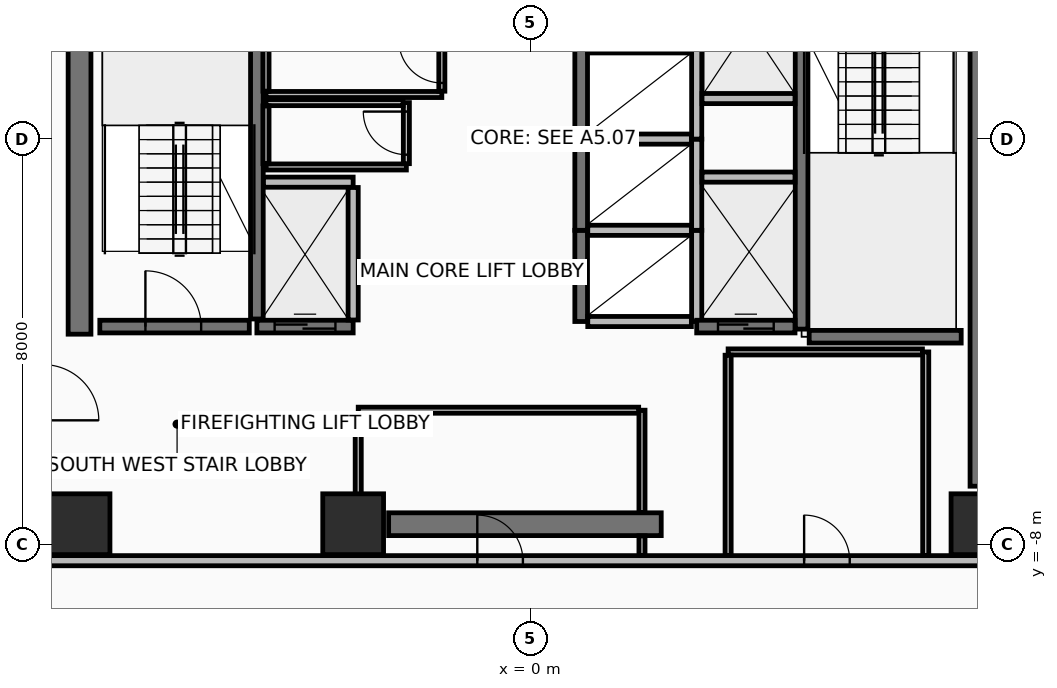
"""IFC4 building model, lengths in metres.
Left out: names, types, materials, properties, quantities, classifications, styles, units other than length and angle.
Written with IfcOpenShell. Run it as: python <this file> out.ifc"""

import sys

from ifc_helpers import new_model, si_unit, direction, frame, frame_2d, origin, origin_2d, place, context, subcontext, project, spatial, rectangle, extrude, element, fill, save


model = new_model("IFC4")
c1 = context("Model", 3, precision=1e-05, world=origin(), true_north=direction((0.0, 1.0)))
c2 = subcontext(c1, "Body", "Model", "MODEL_VIEW")
j1 = project(units=[si_unit("LENGTHUNIT", "METRE"), si_unit("PLANEANGLEUNIT", "RADIAN")], contexts=[c1])
p1 = place(None, origin())
s1 = spatial("IfcSite", under=j1, at=p1, CompositionType="ELEMENT")
p2 = place(p1, origin())
s2 = spatial("IfcBuilding", under=s1, at=p2, CompositionType="ELEMENT")
p3 = place(p2, frame((0.0, 0.0, 93.3)))
s3 = spatial("IfcBuildingStorey", under=s2, at=p3, CompositionType="ELEMENT", Elevation=93.3)
for number, where, z_axis, x_axis in (
    (1, (-8.9, -7.6, 0.0), (0.0, 0.0, 1.0), (1.0, 0.0, 0.0)),
    (2, (-3.5, -7.6, 0.0), (0.0, 0.0, 1.0), (1.0, 0.0, 0.0)),
    (3, (8.9, -7.6, 0.0), (0.0, 0.0, 1.0), (1.0, 0.0, 0.0)),
):
    element("IfcColumn", number, at=place(p3, frame(where, z_axis=z_axis, x_axis=x_axis)), inside=s3, PredefinedType="COLUMN", context=c2, shape_type="SweptSolid", body=[
        extrude(rectangle(XDim=1.2, YDim=1.2, at=origin_2d()), origin(), (0.0, 0.0, 1.0), 3.6),
    ])
p4 = place(p3, frame((-2.8, -7.6, 0.0), z_axis=(0.0, 0.0, 1.0), x_axis=(1.0, 0.0, 0.0)))
e4 = element("IfcWall", 4, at=p4, inside=s3, PredefinedType="SHEAR", context=c2, shape_type="SweptSolid", body=[
    extrude(rectangle(XDim=5.38, YDim=0.45, at=frame_2d((2.69, 0.0))), origin(), (0.0, 0.0, 1.0), 3.41),
])
for number, where, z_axis, x_axis in (
    (5, (-8.9, -3.85, 0.0), (0.0, 0.0, 1.0), (0.0, 1.0, 0.0)),
    (6, (8.9, -6.85, 0.0), (0.0, 0.0, 1.0), (0.0, 1.0, 0.0)),
):
    element("IfcWall", number, at=place(p3, frame(where, z_axis=z_axis, x_axis=x_axis)), inside=s3, PredefinedType="SHEAR", context=c2, shape_type="SweptSolid", body=[
        extrude(rectangle(XDim=10.7, YDim=0.45, at=frame_2d((5.35, 0.0))), origin(), (0.0, 0.0, 1.0), 3.41),
    ])
p5 = place(p3, frame((-9.62, -8.32, 0.0), z_axis=(0.0, 0.0, 1.0), x_axis=(1.0, 0.0, 0.0)))
e7 = element("IfcWall", 7, at=p5, inside=s3, PredefinedType="PARTITIONING", context=c2, shape_type="SweptSolid", body=[
    extrude(rectangle(XDim=19.24, YDim=0.2, at=frame_2d((9.62, 0.0))), origin(), (0.0, 0.0, 1.0), 2.805),
])
p6 = place(p5, frame((8.57, 0.0, 0.0)))
e8 = element("IfcOpeningElement", 8, at=p6, cuts=e7, PredefinedType="OPENING", context=c2, shape_type="SweptSolid", body=[
    extrude(rectangle(XDim=0.9, YDim=2.1, at=frame_2d((0.45, 1.05))), frame((0.0, 0.11, 0.0), z_axis=(0.0, -1.0, 0.0), x_axis=(1.0, 0.0, 0.0)), (0.0, 0.0, 1.0), 0.22),
])
p7 = place(p5, frame((15.02, 0.0, 0.0)))
e9 = element("IfcOpeningElement", 9, at=p7, cuts=e7, PredefinedType="OPENING", context=c2, shape_type="SweptSolid", body=[
    extrude(rectangle(XDim=0.9, YDim=2.1, at=frame_2d((0.45, 1.05))), frame((0.0, 0.11, 0.0), z_axis=(0.0, -1.0, 0.0), x_axis=(1.0, 0.0, 0.0)), (0.0, 0.0, 1.0), 0.22),
])
p8 = place(p3, frame((-5.4, -3.55, 0.0), z_axis=(0.0, 0.0, 1.0), x_axis=(0.0, 1.0, 0.0)))
e10 = element("IfcWall", 10, at=p8, inside=s3, PredefinedType="SHEAR", context=c2, shape_type="SweptSolid", body=[
    extrude(rectangle(XDim=7.3, YDim=0.25, at=frame_2d((3.65, 0.0))), origin(), (0.0, 0.0, 1.0), 3.41),
])
p9 = place(p3, frame((-8.5, -3.7, 0.0), z_axis=(0.0, 0.0, 1.0), x_axis=(1.0, 0.0, 0.0)))
e11 = element("IfcWall", 11, at=p9, inside=s3, PredefinedType="SHEAR", context=c2, shape_type="SweptSolid", body=[
    extrude(rectangle(XDim=2.95, YDim=0.25, at=frame_2d((1.475, 0.0))), origin(), (0.0, 0.0, 1.0), 3.41),
])
p10 = place(p9, frame((0.9, 0.0, 0.0)))
e12 = element("IfcOpeningElement", 12, at=p10, cuts=e11, PredefinedType="OPENING", context=c2, shape_type="SweptSolid", body=[
    extrude(rectangle(XDim=1.1, YDim=2.15, at=frame_2d((0.55, 1.075))), frame((0.0, 0.135, 0.0), z_axis=(0.0, -1.0, 0.0), x_axis=(1.0, 0.0, 0.0)), (0.0, 0.0, 1.0), 0.27),
])
p11 = place(p3, frame((5.35, -3.75, 0.0), z_axis=(0.0, 0.0, 1.0), x_axis=(0.0, 1.0, 0.0)))
e13 = element("IfcWall", 13, at=p11, inside=s3, PredefinedType="SHEAR", context=c2, shape_type="SweptSolid", body=[
    extrude(rectangle(XDim=7.3, YDim=0.25, at=frame_2d((3.65, 0.0))), origin(), (0.0, 0.0, 1.0), 3.41),
])
p12 = place(p3, frame((5.5, -3.9, 0.0), z_axis=(0.0, 0.0, 1.0), x_axis=(1.0, 0.0, 0.0)))
e14 = element("IfcWall", 14, at=p12, inside=s3, PredefinedType="SHEAR", context=c2, shape_type="SweptSolid", body=[
    extrude(rectangle(XDim=3.0, YDim=0.25, at=frame_2d((1.5, 0.0))), origin(), (0.0, 0.0, 1.0), 3.41),
])
p13 = place(p3, frame((1.0, -3.6, 0.0), z_axis=(0.0, 0.0, 1.0), x_axis=(0.0, 1.0, 0.0)))
e15 = element("IfcWall", 15, at=p13, inside=s3, PredefinedType="SHEAR", context=c2, shape_type="SweptSolid", body=[
    extrude(rectangle(XDim=1.8, YDim=0.25, at=frame_2d((0.9, 0.0))), origin(), (0.0, 0.0, 1.0), 3.41),
])
p14 = place(p3, frame((3.28, -3.6, 0.0), z_axis=(0.0, 0.0, 1.0), x_axis=(0.0, 1.0, 0.0)))
e16 = element("IfcWall", 16, at=p14, inside=s3, PredefinedType="PARTITIONING", context=c2, shape_type="SweptSolid", body=[
    extrude(rectangle(XDim=1.8, YDim=0.2, at=frame_2d((0.9, 0.0))), origin(), (0.0, 0.0, 1.0), 3.41),
])
for number, where, z_axis, x_axis in (
    (17, (1.13, -3.6, 0.0), (0.0, 0.0, 1.0), (1.0, 0.0, 0.0)),
    (18, (1.13, -1.8, 0.0), (0.0, 0.0, 1.0), (1.0, 0.0, 0.0)),
):
    element("IfcWall", number, at=place(p3, frame(where, z_axis=z_axis, x_axis=x_axis)), inside=s3, PredefinedType="PARTITIONING", context=c2, shape_type="SweptSolid", body=[
        extrude(rectangle(XDim=2.045, YDim=0.2, at=frame_2d((1.022, 0.0))), origin(), (0.0, 0.0, 1.0), 3.41),
    ])
p15 = place(p3, frame((1.0, -1.8, 0.0), z_axis=(0.0, 0.0, 1.0), x_axis=(0.0, 1.0, 0.0)))
e19 = element("IfcWall", 19, at=p15, inside=s3, PredefinedType="SHEAR", context=c2, shape_type="SweptSolid", body=[
    extrude(rectangle(XDim=1.8, YDim=0.25, at=frame_2d((0.9, 0.0))), origin(), (0.0, 0.0, 1.0), 3.41),
])
p16 = place(p3, frame((3.28, -1.8, 0.0), z_axis=(0.0, 0.0, 1.0), x_axis=(0.0, 1.0, 0.0)))
e20 = element("IfcWall", 20, at=p16, inside=s3, PredefinedType="PARTITIONING", context=c2, shape_type="SweptSolid", body=[
    extrude(rectangle(XDim=1.8, YDim=0.2, at=frame_2d((0.9, 0.0))), origin(), (0.0, 0.0, 1.0), 3.41),
])
p17 = place(p3, frame((1.13, 0.0, 0.0), z_axis=(0.0, 0.0, 1.0), x_axis=(1.0, 0.0, 0.0)))
e21 = element("IfcWall", 21, at=p17, inside=s3, PredefinedType="PARTITIONING", context=c2, shape_type="SweptSolid", body=[
    extrude(rectangle(XDim=2.045, YDim=0.2, at=frame_2d((1.022, 0.0))), origin(), (0.0, 0.0, 1.0), 3.41),
])
p18 = place(p3, frame((1.0, 0.0, 0.0), z_axis=(0.0, 0.0, 1.0), x_axis=(0.0, 1.0, 0.0)))
e22 = element("IfcWall", 22, at=p18, inside=s3, PredefinedType="SHEAR", context=c2, shape_type="SweptSolid", body=[
    extrude(rectangle(XDim=1.8, YDim=0.25, at=frame_2d((0.9, 0.0))), origin(), (0.0, 0.0, 1.0), 3.41),
])
p19 = place(p3, frame((3.28, 0.0, 0.0), z_axis=(0.0, 0.0, 1.0), x_axis=(0.0, 1.0, 0.0)))
e23 = element("IfcWall", 23, at=p19, inside=s3, PredefinedType="PARTITIONING", context=c2, shape_type="SweptSolid", body=[
    extrude(rectangle(XDim=1.8, YDim=0.2, at=frame_2d((0.9, 0.0))), origin(), (0.0, 0.0, 1.0), 3.41),
])
p20 = place(p3, frame((1.13, 1.8, 0.0), z_axis=(0.0, 0.0, 1.0), x_axis=(1.0, 0.0, 0.0)))
e24 = element("IfcWall", 24, at=p20, inside=s3, PredefinedType="PARTITIONING", context=c2, shape_type="SweptSolid", body=[
    extrude(rectangle(XDim=2.045, YDim=0.2, at=frame_2d((1.022, 0.0))), origin(), (0.0, 0.0, 1.0), 3.41),
])
p21 = place(p3, frame((-5.4, -3.7, 0.0), z_axis=(0.0, 0.0, 1.0), x_axis=(1.0, 0.0, 0.0)))
e25 = element("IfcWall", 25, at=p21, inside=s3, PredefinedType="SHEAR", context=c2, shape_type="SweptSolid", body=[
    extrude(rectangle(XDim=1.9, YDim=0.25, at=frame_2d((0.95, 0.0))), origin(), (0.0, 0.0, 1.0), 3.41),
])
p22 = place(p21, frame((0.35, 0.0, 0.0)))
e26 = element("IfcOpeningElement", 26, at=p22, cuts=e25, PredefinedType="OPENING", context=c2, shape_type="SweptSolid", body=[
    extrude(rectangle(XDim=1.2, YDim=2.2, at=frame_2d((0.6, 1.1))), frame((0.0, 0.135, 0.0), z_axis=(0.0, -1.0, 0.0), x_axis=(1.0, 0.0, 0.0)), (0.0, 0.0, 1.0), 0.27),
])
p23 = place(p3, frame((-5.27, -0.85, 0.0), z_axis=(0.0, 0.0, 1.0), x_axis=(1.0, 0.0, 0.0)))
e27 = element("IfcWall", 27, at=p23, inside=s3, PredefinedType="PARTITIONING", context=c2, shape_type="SweptSolid", body=[
    extrude(rectangle(XDim=1.77, YDim=0.2, at=frame_2d((0.885, 0.0))), origin(), (0.0, 0.0, 1.0), 3.41),
])
p24 = place(p3, frame((-3.5, -3.57, 0.0), z_axis=(0.0, 0.0, 1.0), x_axis=(0.0, 1.0, 0.0)))
e28 = element("IfcWall", 28, at=p24, inside=s3, PredefinedType="PARTITIONING", context=c2, shape_type="SweptSolid", body=[
    extrude(rectangle(XDim=2.615, YDim=0.2, at=frame_2d((1.308, 0.0))), origin(), (0.0, 0.0, 1.0), 3.41),
])
p25 = place(p3, frame((3.385, 0.8, 0.0), z_axis=(0.0, 0.0, 1.0), x_axis=(1.0, 0.0, 0.0)))
e29 = element("IfcWall", 29, at=p25, inside=s3, PredefinedType="PARTITIONING", context=c2, shape_type="SweptSolid", body=[
    extrude(rectangle(XDim=1.835, YDim=0.2, at=frame_2d((0.917, 0.0))), origin(), (0.0, 0.0, 1.0), 3.41),
])
p26 = place(p3, frame((3.28, -3.7, 0.0), z_axis=(0.0, 0.0, 1.0), x_axis=(1.0, 0.0, 0.0)))
e30 = element("IfcWall", 30, at=p26, inside=s3, PredefinedType="SHEAR", context=c2, shape_type="SweptSolid", body=[
    extrude(rectangle(XDim=1.94, YDim=0.25, at=frame_2d((0.97, 0.0))), origin(), (0.0, 0.0, 1.0), 3.41),
])
p27 = place(p26, frame((0.42, 0.0, 0.0)))
e31 = element("IfcOpeningElement", 31, at=p27, cuts=e30, PredefinedType="OPENING", context=c2, shape_type="SweptSolid", body=[
    extrude(rectangle(XDim=1.1, YDim=2.2, at=frame_2d((0.55, 1.1))), frame((0.0, 0.135, 0.0), z_axis=(0.0, -1.0, 0.0), x_axis=(1.0, 0.0, 0.0)), (0.0, 0.0, 1.0), 0.27),
])
p28 = place(p3, frame((3.385, -0.75, 0.0), z_axis=(0.0, 0.0, 1.0), x_axis=(1.0, 0.0, 0.0)))
e32 = element("IfcWall", 32, at=p28, inside=s3, PredefinedType="PARTITIONING", context=c2, shape_type="SweptSolid", body=[
    extrude(rectangle(XDim=1.835, YDim=0.2, at=frame_2d((0.917, 0.0))), origin(), (0.0, 0.0, 1.0), 3.41),
])
p29 = place(p3, frame((-5.22, 0.88, 0.0), z_axis=(0.0, 0.0, 1.0), x_axis=(1.0, 0.0, 0.0)))
e33 = element("IfcWall", 33, at=p29, inside=s3, PredefinedType="PARTITIONING", context=c2, shape_type="SweptSolid", body=[
    extrude(rectangle(XDim=3.47, YDim=0.12, at=frame_2d((1.735, 0.0))), origin(), (0.0, 0.0, 1.0), 3.41),
])
p30 = place(p3, frame((-1.75, 0.945, 0.0), z_axis=(0.0, 0.0, 1.0), x_axis=(0.0, 1.0, 0.0)))
e34 = element("IfcWall", 34, at=p30, inside=s3, PredefinedType="PARTITIONING", context=c2, shape_type="SweptSolid", body=[
    extrude(rectangle(XDim=1.175, YDim=0.12, at=frame_2d((0.587, 0.0))), origin(), (0.0, 0.0, 1.0), 3.41),
])
p31 = place(p30, frame((0.163, 0.0, 0.0)))
e35 = element("IfcOpeningElement", 35, at=p31, cuts=e34, PredefinedType="OPENING", context=c2, shape_type="SweptSolid", body=[
    extrude(rectangle(XDim=0.85, YDim=2.1, at=frame_2d((0.425, 1.05))), frame((0.0, 0.07, 0.0), z_axis=(0.0, -1.0, 0.0), x_axis=(1.0, 0.0, 0.0)), (0.0, 0.0, 1.0), 0.14),
])
p32 = place(p3, frame((-5.22, 2.055, 0.0), z_axis=(0.0, 0.0, 1.0), x_axis=(0.0, -1.0, 0.0)))
e36 = element("IfcWall", 36, at=p32, inside=s3, PredefinedType="PARTITIONING", context=c2, shape_type="SweptSolid", body=[
    extrude(rectangle(XDim=1.11, YDim=0.12, at=frame_2d((0.555, 0.0))), origin(), (0.0, 0.0, 1.0), 3.41),
])
p33 = place(p3, frame((-5.22, -0.55, 0.0), z_axis=(0.0, 0.0, 1.0), x_axis=(1.0, 0.0, 0.0)))
e37 = element("IfcWall", 37, at=p33, inside=s3, PredefinedType="PARTITIONING", context=c2, shape_type="SweptSolid", body=[
    extrude(rectangle(XDim=2.77, YDim=0.12, at=frame_2d((1.385, 0.0))), origin(), (0.0, 0.0, 1.0), 3.41),
])
p34 = place(p3, frame((-2.45, -0.485, 0.0), z_axis=(0.0, 0.0, 1.0), x_axis=(0.0, 1.0, 0.0)))
e38 = element("IfcWall", 38, at=p34, inside=s3, PredefinedType="PARTITIONING", context=c2, shape_type="SweptSolid", body=[
    extrude(rectangle(XDim=1.205, YDim=0.12, at=frame_2d((0.603, 0.0))), origin(), (0.0, 0.0, 1.0), 3.41),
])
p35 = place(p34, frame((0.178, 0.0, 0.0)))
e39 = element("IfcOpeningElement", 39, at=p35, cuts=e38, PredefinedType="OPENING", context=c2, shape_type="SweptSolid", body=[
    extrude(rectangle(XDim=0.85, YDim=2.1, at=frame_2d((0.425, 1.05))), frame((0.0, 0.07, 0.0), z_axis=(0.0, -1.0, 0.0), x_axis=(1.0, 0.0, 0.0)), (0.0, 0.0, 1.0), 0.14),
])
p36 = place(p3, frame((-2.515, 0.72, 0.0), z_axis=(0.0, 0.0, 1.0), x_axis=(-1.0, 0.0, 0.0)))
e40 = element("IfcWall", 40, at=p36, inside=s3, PredefinedType="PARTITIONING", context=c2, shape_type="SweptSolid", body=[
    extrude(rectangle(XDim=2.705, YDim=0.12, at=frame_2d((1.353, 0.0))), origin(), (0.0, 0.0, 1.0), 3.41),
])
p37 = place(p3, frame((-5.22, 0.655, 0.0), z_axis=(0.0, 0.0, 1.0), x_axis=(0.0, -1.0, 0.0)))
e41 = element("IfcWall", 41, at=p37, inside=s3, PredefinedType="PARTITIONING", context=c2, shape_type="SweptSolid", body=[
    extrude(rectangle(XDim=1.14, YDim=0.12, at=frame_2d((0.57, 0.0))), origin(), (0.0, 0.0, 1.0), 3.41),
])
p38 = place(p3, frame((2.2, -8.215, 0.0), z_axis=(0.0, 0.0, 1.0), x_axis=(0.0, 1.0, 0.0)))
e42 = element("IfcWall", 42, at=p38, inside=s3, PredefinedType="PARTITIONING", context=c2, shape_type="SweptSolid", body=[
    extrude(rectangle(XDim=0.385, YDim=0.12, at=frame_2d((0.192, 0.0))), origin(), (0.0, 0.0, 1.0), 2.605),
])
p39 = place(p3, frame((2.2, -7.37, 0.0), z_axis=(0.0, 0.0, 1.0), x_axis=(0.0, 1.0, 0.0)))
e43 = element("IfcWall", 43, at=p39, inside=s3, PredefinedType="PARTITIONING", context=c2, shape_type="SweptSolid", body=[
    extrude(rectangle(XDim=2.02, YDim=0.12, at=frame_2d((1.01, 0.0))), origin(), (0.0, 0.0, 1.0), 2.605),
])
p40 = place(p3, frame((2.135, -5.35, 0.0), z_axis=(0.0, 0.0, 1.0), x_axis=(-1.0, 0.0, 0.0)))
e44 = element("IfcWall", 44, at=p40, inside=s3, PredefinedType="PARTITIONING", context=c2, shape_type="SweptSolid", body=[
    extrude(rectangle(XDim=5.535, YDim=0.12, at=frame_2d((2.768, 0.0))), origin(), (0.0, 0.0, 1.0), 2.605),
])
p41 = place(p3, frame((-3.4, -5.415, 0.0), z_axis=(0.0, 0.0, 1.0), x_axis=(0.0, -1.0, 0.0)))
e45 = element("IfcWall", 45, at=p41, inside=s3, PredefinedType="PARTITIONING", context=c2, shape_type="SweptSolid", body=[
    extrude(rectangle(XDim=2.8, YDim=0.12, at=frame_2d((1.4, 0.0))), origin(), (0.0, 0.0, 1.0), 2.605),
])
p42 = place(p3, frame((7.8, -8.215, 0.0), z_axis=(0.0, 0.0, 1.0), x_axis=(0.0, 1.0, 0.0)))
e46 = element("IfcWall", 46, at=p42, inside=s3, PredefinedType="PARTITIONING", context=c2, shape_type="SweptSolid", body=[
    extrude(rectangle(XDim=4.015, YDim=0.12, at=frame_2d((2.008, 0.0))), origin(), (0.0, 0.0, 1.0), 2.605),
])
p43 = place(p3, frame((7.735, -4.2, 0.0), z_axis=(0.0, 0.0, 1.0), x_axis=(-1.0, 0.0, 0.0)))
e47 = element("IfcWall", 47, at=p43, inside=s3, PredefinedType="PARTITIONING", context=c2, shape_type="SweptSolid", body=[
    extrude(rectangle(XDim=3.835, YDim=0.12, at=frame_2d((1.917, 0.0))), origin(), (0.0, 0.0, 1.0), 3.41),
])
p44 = place(p3, frame((3.9, -4.265, 0.0), z_axis=(0.0, 0.0, 1.0), x_axis=(0.0, -1.0, 0.0)))
e48 = element("IfcWall", 48, at=p44, inside=s3, PredefinedType="PARTITIONING", context=c2, shape_type="SweptSolid", body=[
    extrude(rectangle(XDim=3.95, YDim=0.12, at=frame_2d((1.975, 0.0))), origin(), (0.0, 0.0, 1.0), 2.605),
])
p45 = place(p10, origin())
e49 = element("IfcDoor", 49, at=p45, inside=s3, OperationType="SINGLE_SWING_LEFT", PredefinedType="DOOR", context=c2, shape_type="SweptSolid", body=[
    extrude(rectangle(XDim=1.1, YDim=2.15, at=frame_2d((0.55, 1.075))), frame((0.0, 0.025, 0.0), z_axis=(0.0, -1.0, 0.0), x_axis=(1.0, 0.0, 0.0)), (0.0, 0.0, 1.0), 0.05),
])
fill(e12, e49)
p46 = place(p22, origin())
e50 = element("IfcDoor", 50, at=p46, inside=s3, OperationType="SLIDING_TO_RIGHT", PredefinedType="DOOR", context=c2, shape_type="SweptSolid", body=[
    extrude(rectangle(XDim=1.2, YDim=2.2, at=frame_2d((0.6, 1.1))), frame((0.0, 0.025, 0.0), z_axis=(0.0, -1.0, 0.0), x_axis=(1.0, 0.0, 0.0)), (0.0, 0.0, 1.0), 0.05),
])
fill(e26, e50)
p47 = place(p27, origin())
e51 = element("IfcDoor", 51, at=p47, inside=s3, OperationType="SLIDING_TO_LEFT", PredefinedType="DOOR", context=c2, shape_type="SweptSolid", body=[
    extrude(rectangle(XDim=1.1, YDim=2.2, at=frame_2d((0.55, 1.1))), frame((0.0, 0.025, 0.0), z_axis=(0.0, -1.0, 0.0), x_axis=(1.0, 0.0, 0.0)), (0.0, 0.0, 1.0), 0.05),
])
fill(e31, e51)
p48 = place(p31, frame((0.85, 0.0, 0.0), z_axis=(0.0, 0.0, 1.0), x_axis=(-1.0, 0.0, 0.0)))
e52 = element("IfcDoor", 52, at=p48, inside=s3, OperationType="SINGLE_SWING_RIGHT", PredefinedType="DOOR", context=c2, shape_type="SweptSolid", body=[
    extrude(rectangle(XDim=0.85, YDim=2.1, at=frame_2d((0.425, 1.05))), frame((0.0, 0.025, 0.0), z_axis=(0.0, -1.0, 0.0), x_axis=(1.0, 0.0, 0.0)), (0.0, 0.0, 1.0), 0.05),
])
fill(e35, e52)
p49 = place(p35, frame((0.85, 0.0, 0.0), z_axis=(0.0, 0.0, 1.0), x_axis=(-1.0, 0.0, 0.0)))
e53 = element("IfcDoor", 53, at=p49, inside=s3, OperationType="SINGLE_SWING_RIGHT", PredefinedType="DOOR", context=c2, shape_type="SweptSolid", body=[
    extrude(rectangle(XDim=0.85, YDim=2.1, at=frame_2d((0.425, 1.05))), frame((0.0, 0.025, 0.0), z_axis=(0.0, -1.0, 0.0), x_axis=(1.0, 0.0, 0.0)), (0.0, 0.0, 1.0), 0.05),
])
fill(e39, e53)
p50 = place(p6, origin())
e54 = element("IfcDoor", 54, at=p50, inside=s3, OperationType="SINGLE_SWING_LEFT", PredefinedType="DOOR", context=c2, shape_type="SweptSolid", body=[
    extrude(rectangle(XDim=0.9, YDim=2.1, at=frame_2d((0.45, 1.05))), frame((0.0, 0.025, 0.0), z_axis=(0.0, -1.0, 0.0), x_axis=(1.0, 0.0, 0.0)), (0.0, 0.0, 1.0), 0.05),
])
fill(e8, e54)
p51 = place(p7, origin())
e55 = element("IfcDoor", 55, at=p51, inside=s3, OperationType="SINGLE_SWING_LEFT", PredefinedType="DOOR", context=c2, shape_type="SweptSolid", body=[
    extrude(rectangle(XDim=0.9, YDim=2.1, at=frame_2d((0.45, 1.05))), frame((0.0, 0.025, 0.0), z_axis=(0.0, -1.0, 0.0), x_axis=(1.0, 0.0, 0.0)), (0.0, 0.0, 1.0), 0.05),
])
fill(e9, e55)
save(model, sys.argv[1])
